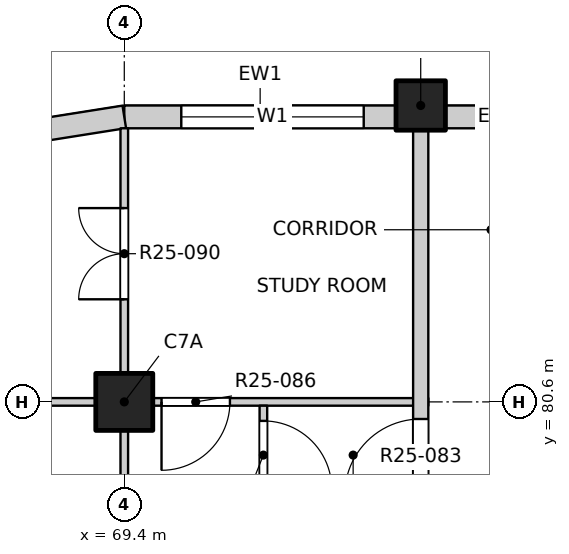
"""IFC4 building model, lengths in metres.
Left out: names, types, materials, properties, quantities, classifications, styles, units other than length and angle.
Written with IfcOpenShell. Run it as: python <this file> out.ifc"""

import sys

from ifc_helpers import new_model, si_unit, direction, frame, frame_2d, origin, origin_2d, place, context, subcontext, project, spatial, rectangle, extrude, element, fill, save


model = new_model("IFC4")
c1 = context("Model", 3, precision=1e-05, world=origin(), true_north=direction((0.0, 1.0)))
c2 = subcontext(c1, "Body", "Model", "MODEL_VIEW")
j1 = project(units=[si_unit("LENGTHUNIT", "METRE"), si_unit("PLANEANGLEUNIT", "RADIAN")], contexts=[c1])
p1 = place(None, origin())
s1 = spatial("IfcSite", under=j1, at=p1, CompositionType="ELEMENT")
p2 = place(p1, origin())
s2 = spatial("IfcBuilding", under=s1, at=p2, CompositionType="ELEMENT")
p3 = place(p2, frame((0.0, 0.0, 252.8)))
s3 = spatial("IfcBuildingStorey", under=s2, at=p3, CompositionType="ELEMENT", Elevation=252.8)
p4 = place(p3, frame((73.3, 84.5, -0.25), z_axis=(0.0, 0.0, 1.0), x_axis=(1.0, 0.0, 0.0)))
e1 = element("IfcColumn", 1, at=p4, inside=s3, PredefinedType="COLUMN", context=c2, shape_type="SweptSolid", body=[
    extrude(rectangle(XDim=0.65, YDim=0.65, at=origin_2d()), origin(), (0.0, 0.0, 1.0), 3.4),
])
p5 = place(p3, frame((69.4, 80.6, -0.25), z_axis=(0.0, 0.0, 1.0), x_axis=(1.0, 0.0, 0.0)))
e2 = element("IfcColumn", 2, at=p5, inside=s3, PredefinedType="COLUMN", context=c2, shape_type="SweptSolid", body=[
    extrude(rectangle(XDim=0.75, YDim=0.75, at=origin_2d()), origin(), (0.0, 0.0, 1.0), 3.4),
])
p6 = place(p3, frame((69.4, 84.35, 0.0), z_axis=(0.0, 0.0, 1.0), x_axis=(1.0, 0.0, 0.0)))
e3 = element("IfcWall", 3, at=p6, inside=s3, PredefinedType="SOLIDWALL", context=c2, shape_type="SweptSolid", body=[
    extrude(rectangle(XDim=3.575, YDim=0.3, at=frame_2d((1.788, 0.0))), origin(), (0.0, 0.0, 1.0), 2.7),
])
p7 = place(p6, frame((0.75, 0.0, 0.9)))
e4 = element("IfcOpeningElement", 4, at=p7, cuts=e3, PredefinedType="OPENING", context=c2, shape_type="SweptSolid", body=[
    extrude(rectangle(XDim=2.4, YDim=1.8, at=frame_2d((1.2, 0.9))), frame((0.0, 0.16, 0.0), z_axis=(0.0, -1.0, 0.0), x_axis=(1.0, 0.0, 0.0)), (0.0, 0.0, 1.0), 0.32),
])
p8 = place(p3, frame((73.625, 84.35, 0.0), z_axis=(0.0, 0.0, 1.0), x_axis=(1.0, 0.0, 0.0)))
e5 = element("IfcWall", 5, at=p8, inside=s3, PredefinedType="SOLIDWALL", context=c2, shape_type="SweptSolid", body=[
    extrude(rectangle(XDim=1.425, YDim=0.3, at=frame_2d((0.712, 0.0))), origin(), (0.0, 0.0, 1.0), 2.7),
])
p9 = place(p3, frame((69.4, 84.35, 0.0), z_axis=(0.0, 0.0, 1.0), x_axis=(-0.987678452879, -0.156496880861, 0.0)))
e6 = element("IfcWall", 6, at=p9, inside=s3, PredefinedType="SOLIDWALL", context=c2, shape_type="SweptSolid", body=[
    extrude(rectangle(XDim=1.173, YDim=0.3, at=frame_2d((0.586, 0.0))), origin(), (0.0, 0.0, 1.0), 2.7),
])
p10 = place(p3, frame((65.8, 80.6, 0.0), z_axis=(0.0, 0.0, 1.0), x_axis=(1.0, 0.0, 0.0)))
e7 = element("IfcWall", 7, at=p10, inside=s3, PredefinedType="PARTITIONING", context=c2, shape_type="SweptSolid", body=[
    extrude(rectangle(XDim=7.6, YDim=0.1, at=frame_2d((3.8, 0.0))), origin(), (0.0, 0.0, 1.0), 3.15),
])
p11 = place(p10, frame((4.09, 0.0, 0.0)))
e8 = element("IfcOpeningElement", 8, at=p11, cuts=e7, PredefinedType="OPENING", context=c2, shape_type="SweptSolid", body=[
    extrude(rectangle(XDim=0.9, YDim=2.1, at=frame_2d((0.45, 1.05))), frame((0.0, 0.06, 0.0), z_axis=(0.0, -1.0, 0.0), x_axis=(1.0, 0.0, 0.0)), (0.0, 0.0, 1.0), 0.12),
])
p12 = place(p3, frame((69.4, 45.8, 0.0), z_axis=(0.0, 0.0, 1.0), x_axis=(0.0, 1.0, 0.0)))
e9 = element("IfcWall", 9, at=p12, inside=s3, PredefinedType="PARTITIONING", context=c2, shape_type="SweptSolid", body=[
    extrude(rectangle(XDim=38.4, YDim=0.1, at=frame_2d((19.2, 0.0))), origin(), (0.0, 0.0, 1.0), 3.15),
])
p13 = place(p12, frame((1.05, 0.0, 0.0)))
e10 = element("IfcOpeningElement", 10, at=p13, cuts=e9, PredefinedType="OPENING", context=c2, shape_type="SweptSolid", body=[
    extrude(rectangle(XDim=1.2, YDim=2.1, at=frame_2d((0.6, 1.05))), frame((0.0, 0.06, 0.0), z_axis=(0.0, -1.0, 0.0), x_axis=(1.0, 0.0, 0.0)), (0.0, 0.0, 1.0), 0.12),
])
p14 = place(p12, frame((5.1, 0.0, 0.0)))
e11 = element("IfcOpeningElement", 11, at=p14, cuts=e9, PredefinedType="OPENING", context=c2, shape_type="SweptSolid", body=[
    extrude(rectangle(XDim=0.9, YDim=2.1, at=frame_2d((0.45, 1.05))), frame((0.0, 0.06, 0.0), z_axis=(0.0, -1.0, 0.0), x_axis=(1.0, 0.0, 0.0)), (0.0, 0.0, 1.0), 0.12),
])
p15 = place(p12, frame((9.0, 0.0, 0.0)))
e12 = element("IfcOpeningElement", 12, at=p15, cuts=e9, PredefinedType="OPENING", context=c2, shape_type="SweptSolid", body=[
    extrude(rectangle(XDim=0.9, YDim=2.1, at=frame_2d((0.45, 1.05))), frame((0.0, 0.06, 0.0), z_axis=(0.0, -1.0, 0.0), x_axis=(1.0, 0.0, 0.0)), (0.0, 0.0, 1.0), 0.12),
])
p16 = place(p12, frame((12.9, 0.0, 0.0)))
e13 = element("IfcOpeningElement", 13, at=p16, cuts=e9, PredefinedType="OPENING", context=c2, shape_type="SweptSolid", body=[
    extrude(rectangle(XDim=0.9, YDim=2.1, at=frame_2d((0.45, 1.05))), frame((0.0, 0.06, 0.0), z_axis=(0.0, -1.0, 0.0), x_axis=(1.0, 0.0, 0.0)), (0.0, 0.0, 1.0), 0.12),
])
p17 = place(p12, frame((16.8, 0.0, 0.0)))
e14 = element("IfcOpeningElement", 14, at=p17, cuts=e9, PredefinedType="OPENING", context=c2, shape_type="SweptSolid", body=[
    extrude(rectangle(XDim=0.9, YDim=2.1, at=frame_2d((0.45, 1.05))), frame((0.0, 0.06, 0.0), z_axis=(0.0, -1.0, 0.0), x_axis=(1.0, 0.0, 0.0)), (0.0, 0.0, 1.0), 0.12),
])
p18 = place(p12, frame((20.7, 0.0, 0.0)))
e15 = element("IfcOpeningElement", 15, at=p18, cuts=e9, PredefinedType="OPENING", context=c2, shape_type="SweptSolid", body=[
    extrude(rectangle(XDim=0.9, YDim=2.1, at=frame_2d((0.45, 1.05))), frame((0.0, 0.06, 0.0), z_axis=(0.0, -1.0, 0.0), x_axis=(1.0, 0.0, 0.0)), (0.0, 0.0, 1.0), 0.12),
])
p19 = place(p12, frame((24.6, 0.0, 0.0)))
e16 = element("IfcOpeningElement", 16, at=p19, cuts=e9, PredefinedType="OPENING", context=c2, shape_type="SweptSolid", body=[
    extrude(rectangle(XDim=0.9, YDim=2.1, at=frame_2d((0.45, 1.05))), frame((0.0, 0.06, 0.0), z_axis=(0.0, -1.0, 0.0), x_axis=(1.0, 0.0, 0.0)), (0.0, 0.0, 1.0), 0.12),
])
p20 = place(p12, frame((28.5, 0.0, 0.0)))
e17 = element("IfcOpeningElement", 17, at=p20, cuts=e9, PredefinedType="OPENING", context=c2, shape_type="SweptSolid", body=[
    extrude(rectangle(XDim=0.9, YDim=2.1, at=frame_2d((0.45, 1.05))), frame((0.0, 0.06, 0.0), z_axis=(0.0, -1.0, 0.0), x_axis=(1.0, 0.0, 0.0)), (0.0, 0.0, 1.0), 0.12),
])
p21 = place(p12, frame((32.4, 0.0, 0.0)))
e18 = element("IfcOpeningElement", 18, at=p21, cuts=e9, PredefinedType="OPENING", context=c2, shape_type="SweptSolid", body=[
    extrude(rectangle(XDim=0.9, YDim=2.1, at=frame_2d((0.45, 1.05))), frame((0.0, 0.06, 0.0), z_axis=(0.0, -1.0, 0.0), x_axis=(1.0, 0.0, 0.0)), (0.0, 0.0, 1.0), 0.12),
])
p22 = place(p12, frame((36.15, 0.0, 0.0)))
e19 = element("IfcOpeningElement", 19, at=p22, cuts=e9, PredefinedType="OPENING", context=c2, shape_type="SweptSolid", body=[
    extrude(rectangle(XDim=1.2, YDim=2.1, at=frame_2d((0.6, 1.05))), frame((0.0, 0.06, 0.0), z_axis=(0.0, -1.0, 0.0), x_axis=(1.0, 0.0, 0.0)), (0.0, 0.0, 1.0), 0.12),
])
p23 = place(p3, frame((71.23, 79.25, 0.0), z_axis=(0.0, 0.0, 1.0), x_axis=(0.0, 1.0, 0.0)))
e20 = element("IfcWall", 20, at=p23, inside=s3, PredefinedType="PARTITIONING", context=c2, shape_type="SweptSolid", body=[
    extrude(rectangle(XDim=1.3, YDim=0.1, at=frame_2d((0.65, 0.0))), origin(), (0.0, 0.0, 1.0), 3.15),
])
p24 = place(p23, frame((0.2, 0.0, 0.0)))
e21 = element("IfcOpeningElement", 21, at=p24, cuts=e20, PredefinedType="OPENING", context=c2, shape_type="SweptSolid", body=[
    extrude(rectangle(XDim=0.9, YDim=2.1, at=frame_2d((0.45, 1.05))), frame((0.0, 0.06, 0.0), z_axis=(0.0, -1.0, 0.0), x_axis=(1.0, 0.0, 0.0)), (0.0, 0.0, 1.0), 0.12),
])
p25 = place(p3, frame((73.3, 49.5, 0.0), z_axis=(0.0, 0.0, 1.0), x_axis=(0.0, 1.0, 0.0)))
e22 = element("IfcWall", 22, at=p25, inside=s3, PredefinedType="PARTITIONING", context=c2, shape_type="SweptSolid", body=[
    extrude(rectangle(XDim=34.7, YDim=0.2, at=frame_2d((17.35, 0.0))), origin(), (0.0, 0.0, 1.0), 3.15),
])
p26 = place(p25, frame((10.175, 0.0, 0.0)))
e23 = element("IfcOpeningElement", 23, at=p26, cuts=e22, PredefinedType="OPENING", context=c2, shape_type="SweptSolid", body=[
    extrude(rectangle(XDim=1.0, YDim=2.1, at=frame_2d((0.5, 1.05))), frame((0.0, 0.11, 0.0), z_axis=(0.0, -1.0, 0.0), x_axis=(1.0, 0.0, 0.0)), (0.0, 0.0, 1.0), 0.22),
])
p27 = place(p25, frame((21.475, 0.0, 0.0)))
e24 = element("IfcOpeningElement", 24, at=p27, cuts=e22, PredefinedType="OPENING", context=c2, shape_type="SweptSolid", body=[
    extrude(rectangle(XDim=1.0, YDim=2.1, at=frame_2d((0.5, 1.05))), frame((0.0, 0.11, 0.0), z_axis=(0.0, -1.0, 0.0), x_axis=(1.0, 0.0, 0.0)), (0.0, 0.0, 1.0), 0.22),
])
p28 = place(p25, frame((29.875, 0.0, 0.0)))
e25 = element("IfcOpeningElement", 25, at=p28, cuts=e22, PredefinedType="OPENING", context=c2, shape_type="SweptSolid", body=[
    extrude(rectangle(XDim=1.0, YDim=2.1, at=frame_2d((0.5, 1.05))), frame((0.0, 0.11, 0.0), z_axis=(0.0, -1.0, 0.0), x_axis=(1.0, 0.0, 0.0)), (0.0, 0.0, 1.0), 0.22),
])
p29 = place(p7, origin())
e26 = element("IfcWindow", 26, at=p29, inside=s3, PartitioningType="DOUBLE_PANEL_VERTICAL", PredefinedType="WINDOW", context=c2, shape_type="SweptSolid", body=[
    extrude(rectangle(XDim=2.4, YDim=1.8, at=frame_2d((1.2, 0.9))), frame((0.0, 0.03, 0.0), z_axis=(0.0, -1.0, 0.0), x_axis=(1.0, 0.0, 0.0)), (0.0, 0.0, 1.0), 0.06),
])
fill(e4, e26)
p30 = place(p28, origin())
e27 = element("IfcDoor", 27, at=p30, inside=s3, OperationType="SINGLE_SWING_RIGHT", PredefinedType="DOOR", context=c2, shape_type="SweptSolid", body=[
    extrude(rectangle(XDim=1.0, YDim=2.1, at=frame_2d((0.5, 1.05))), frame((0.0, 0.025, 0.0), z_axis=(0.0, -1.0, 0.0), x_axis=(1.0, 0.0, 0.0)), (0.0, 0.0, 1.0), 0.05),
])
fill(e25, e27)
p31 = place(p24, origin())
e28 = element("IfcDoor", 28, at=p31, inside=s3, OperationType="SINGLE_SWING_RIGHT", PredefinedType="DOOR", context=c2, shape_type="SweptSolid", body=[
    extrude(rectangle(XDim=0.9, YDim=2.1, at=frame_2d((0.45, 1.05))), frame((0.0, 0.025, 0.0), z_axis=(0.0, -1.0, 0.0), x_axis=(1.0, 0.0, 0.0)), (0.0, 0.0, 1.0), 0.05),
])
fill(e21, e28)
p32 = place(p11, origin())
e29 = element("IfcDoor", 29, at=p32, inside=s3, OperationType="SINGLE_SWING_RIGHT", PredefinedType="DOOR", context=c2, shape_type="SweptSolid", body=[
    extrude(rectangle(XDim=0.9, YDim=2.1, at=frame_2d((0.45, 1.05))), frame((0.0, 0.025, 0.0), z_axis=(0.0, -1.0, 0.0), x_axis=(1.0, 0.0, 0.0)), (0.0, 0.0, 1.0), 0.05),
])
fill(e8, e29)
p33 = place(p22, origin())
e30 = element("IfcDoor", 30, at=p33, inside=s3, OperationType="DOUBLE_DOOR_SINGLE_SWING", PredefinedType="DOOR", context=c2, shape_type="SweptSolid", body=[
    extrude(rectangle(XDim=1.2, YDim=2.1, at=frame_2d((0.6, 1.05))), frame((0.0, 0.025, 0.0), z_axis=(0.0, -1.0, 0.0), x_axis=(1.0, 0.0, 0.0)), (0.0, 0.0, 1.0), 0.05),
])
fill(e19, e30)
save(model, sys.argv[1])
